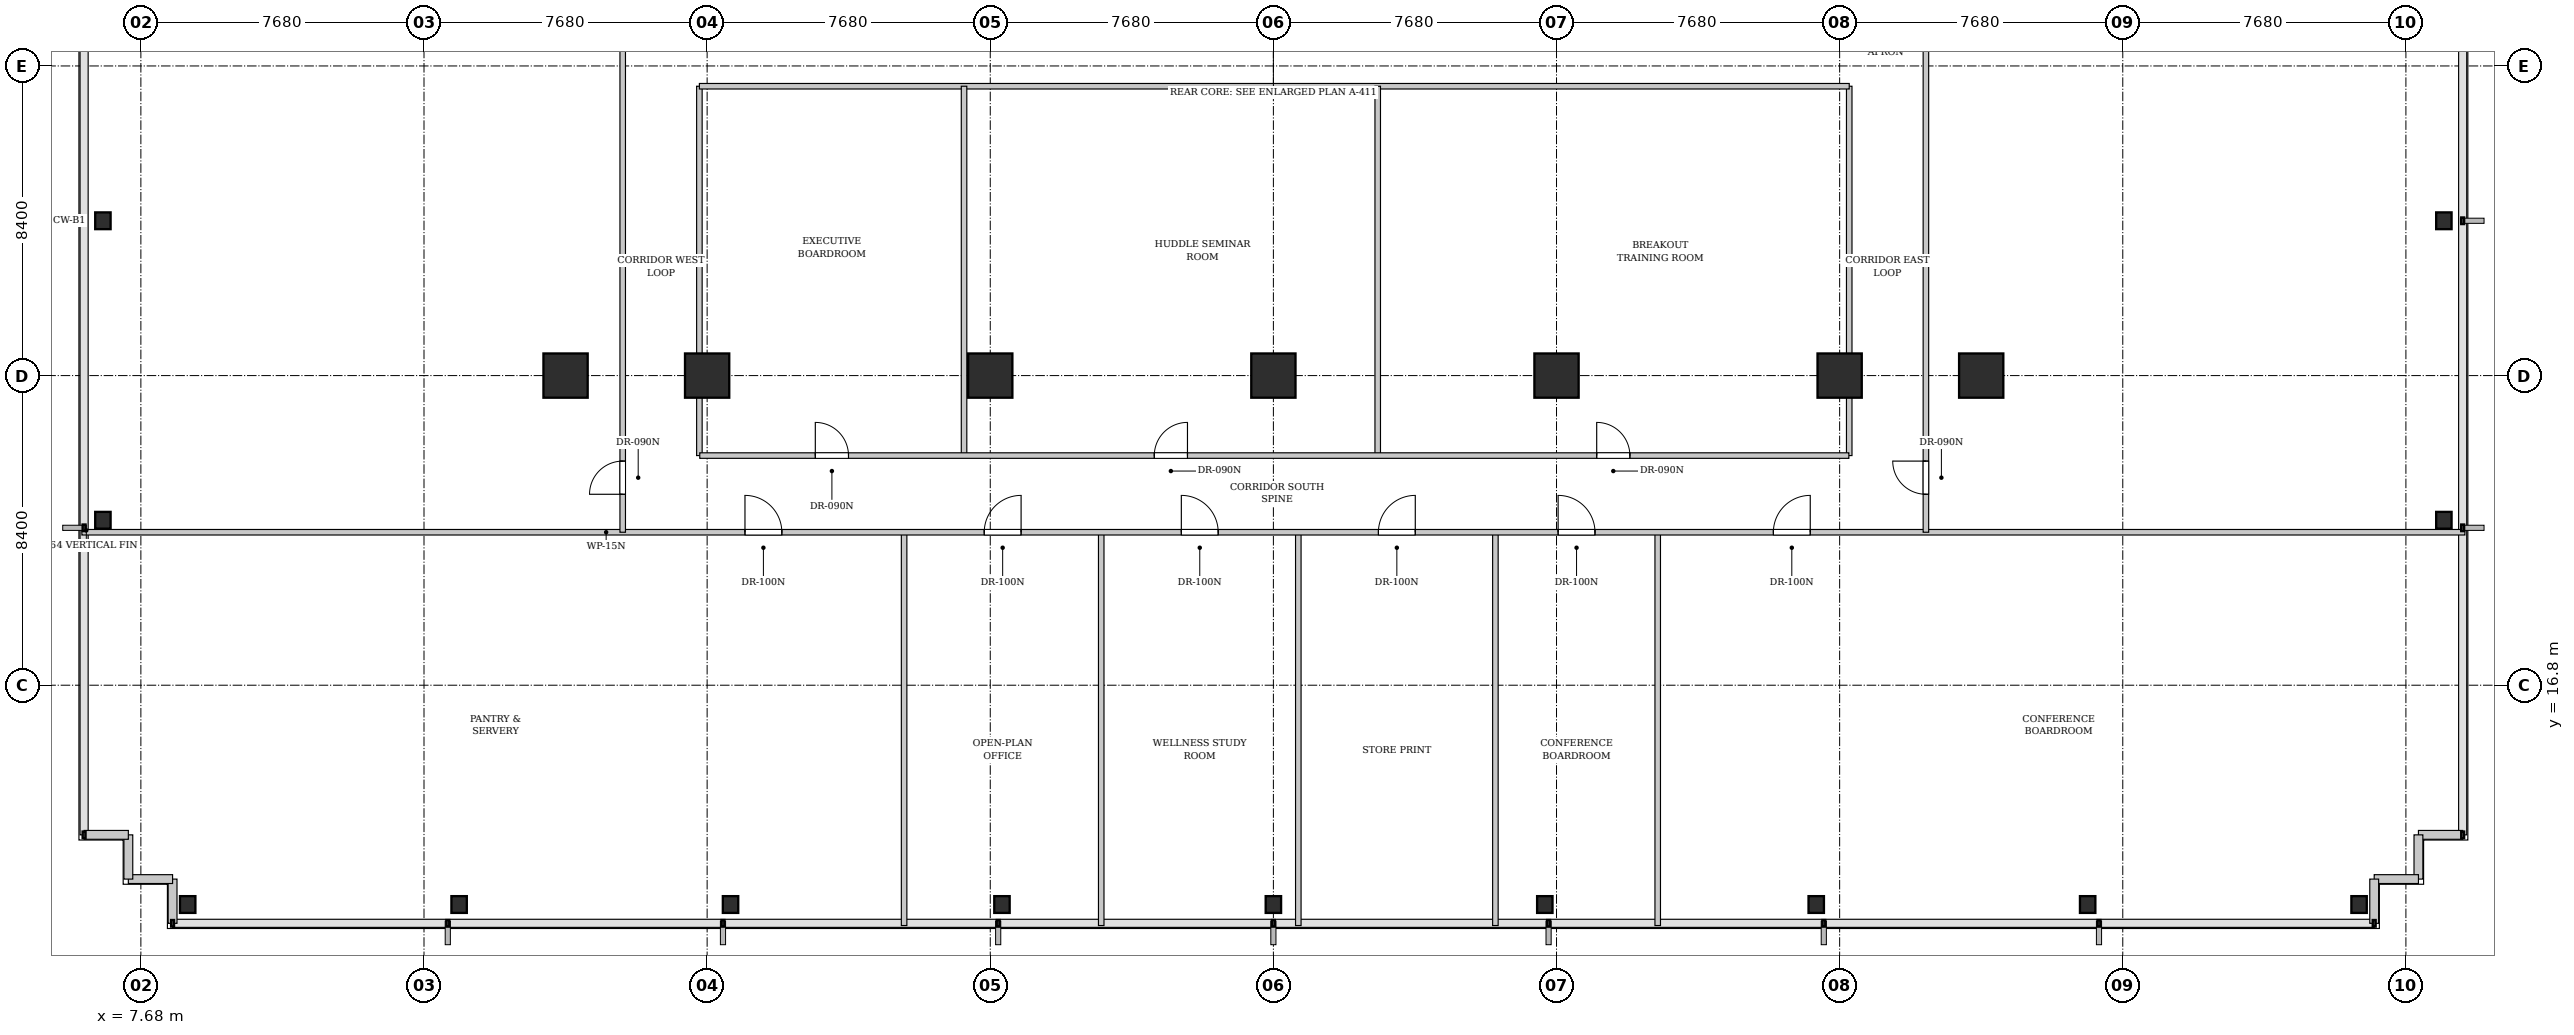
"""IFC4 building model, lengths in metres.
Left out: names, types, materials, properties, quantities, classifications, styles, units other than length and angle.
Written with IfcOpenShell. Run it as: python <this file> out.ifc"""

import sys

from ifc_helpers import new_model, si_unit, direction, frame, frame_2d, origin, origin_2d, place, context, subcontext, project, spatial, rectangle, i_section, extrude, element, fill, save


model = new_model("IFC4")
c1 = context("Model", 3, precision=1e-05, world=origin(), true_north=direction((0.0, 1.0)))
c2 = subcontext(c1, "Body", "Model", "MODEL_VIEW")
j1 = project(units=[si_unit("LENGTHUNIT", "METRE"), si_unit("PLANEANGLEUNIT", "RADIAN")], contexts=[c1])
p1 = place(None, origin())
s1 = spatial("IfcSite", under=j1, at=p1, CompositionType="ELEMENT")
p2 = place(p1, origin())
s2 = spatial("IfcBuilding", under=s1, at=p2, CompositionType="ELEMENT")
p3 = place(p2, frame((0.0, 0.0, 37.2)))
s3 = spatial("IfcBuildingStorey", under=s2, at=p3, CompositionType="ELEMENT", Elevation=37.2)
for number, where, z_axis, x_axis in (
    (1, (23.04, 25.2, 0.0), (0.0, 0.0, 1.0), (1.0, 0.0, 0.0)),
    (2, (30.72, 25.2, 0.0), (0.0, 0.0, 1.0), (1.0, 0.0, 0.0)),
    (3, (38.4, 25.2, 0.0), (0.0, 0.0, 1.0), (1.0, 0.0, 0.0)),
    (4, (46.08, 25.2, 0.0), (0.0, 0.0, 1.0), (1.0, 0.0, 0.0)),
    (5, (53.76, 25.2, 0.0), (0.0, 0.0, 1.0), (1.0, 0.0, 0.0)),
    (6, (19.2, 25.2, 0.0), (0.0, 0.0, 1.0), (1.0, 0.0, 0.0)),
    (7, (57.6, 25.2, 0.0), (0.0, 0.0, 1.0), (1.0, 0.0, 0.0)),
):
    element("IfcColumn", number, at=place(p3, frame(where, z_axis=z_axis, x_axis=x_axis)), inside=s3, PredefinedType="COLUMN", context=c2, shape_type="SweptSolid", body=[
        extrude(rectangle(XDim=1.2, YDim=1.2, at=origin_2d()), origin(), (0.0, 0.0, 1.0), 3.4),
    ])
for number, where, z_axis, x_axis in (
    (8, (8.95, 10.85, 0.0), (0.0, 0.0, 1.0), (1.0, 0.0, 0.0)),
    (9, (16.312, 10.85, 0.0), (0.0, 0.0, 1.0), (1.0, 0.0, 0.0)),
    (10, (23.675, 10.85, 0.0), (0.0, 0.0, 1.0), (1.0, 0.0, 0.0)),
    (11, (31.038, 10.85, 0.0), (0.0, 0.0, 1.0), (1.0, 0.0, 0.0)),
    (12, (38.4, 10.85, 0.0), (0.0, 0.0, 1.0), (1.0, 0.0, 0.0)),
    (13, (45.762, 10.85, 0.0), (0.0, 0.0, 1.0), (1.0, 0.0, 0.0)),
    (14, (53.125, 10.85, 0.0), (0.0, 0.0, 1.0), (1.0, 0.0, 0.0)),
    (15, (60.488, 10.85, 0.0), (0.0, 0.0, 1.0), (1.0, 0.0, 0.0)),
    (16, (67.85, 10.85, 0.0), (0.0, 0.0, 1.0), (1.0, 0.0, 0.0)),
    (17, (6.65, 21.275, 0.0), (0.0, 0.0, 1.0), (1.0, 0.0, 0.0)),
    (18, (70.15, 21.275, 0.0), (0.0, 0.0, 1.0), (1.0, 0.0, 0.0)),
    (19, (6.65, 29.4, 0.0), (0.0, 0.0, 1.0), (1.0, 0.0, 0.0)),
    (20, (70.15, 29.4, 0.0), (0.0, 0.0, 1.0), (1.0, 0.0, 0.0)),
):
    element("IfcColumn", number, at=place(p3, frame(where, z_axis=z_axis, x_axis=x_axis)), inside=s3, PredefinedType="COLUMN", context=c2, shape_type="SweptSolid", body=[
        extrude(i_section(OverallWidth=0.418, OverallDepth=0.455, WebThickness=0.042, FlangeThickness=0.068, FilletRadius=0.015, at=origin_2d()), origin(), (0.0, 0.0, 1.0), 3.4),
    ])
for number, where, z_axis, x_axis in (
    (21, (8.54, 10.34, 0.0), (0.0, 0.0, 1.0), (0.0, 1.0, 0.0)),
    (22, (8.54, 11.54, 0.0), (0.0, 0.0, 1.0), (-1.0, 0.0, 0.0)),
    (23, (7.34, 11.54, 0.0), (0.0, 0.0, 1.0), (0.0, 1.0, 0.0)),
):
    element("IfcWall", number, at=place(p3, frame(where, z_axis=z_axis, x_axis=x_axis)), inside=s3, PredefinedType="SOLIDWALL", context=c2, shape_type="SweptSolid", body=[
        extrude(rectangle(XDim=1.2, YDim=0.24, at=frame_2d((0.6, 0.0))), origin(), (0.0, 0.0, 1.0), 3.18),
    ])
p4 = place(p3, frame((7.34, 12.74, 0.0), z_axis=(0.0, 0.0, 1.0), x_axis=(-1.0, 0.0, 0.0)))
e24 = element("IfcWall", 24, at=p4, inside=s3, PredefinedType="SOLIDWALL", context=c2, shape_type="SweptSolid", body=[
    extrude(rectangle(XDim=1.2, YDim=0.24, at=frame_2d((0.6, 0.0))), origin(), (0.0, 0.0, 1.0), 3.18),
])
for number, where, z_axis, x_axis in (
    (25, (70.66, 12.74, 0.0), (0.0, 0.0, 1.0), (-1.0, 0.0, 0.0)),
    (26, (69.46, 12.74, 0.0), (0.0, 0.0, 1.0), (0.0, -1.0, 0.0)),
    (27, (69.46, 11.54, 0.0), (0.0, 0.0, 1.0), (-1.0, 0.0, 0.0)),
    (28, (68.26, 11.54, 0.0), (0.0, 0.0, 1.0), (0.0, -1.0, 0.0)),
):
    element("IfcWall", number, at=place(p3, frame(where, z_axis=z_axis, x_axis=x_axis)), inside=s3, PredefinedType="SOLIDWALL", context=c2, shape_type="SweptSolid", body=[
        extrude(rectangle(XDim=1.2, YDim=0.24, at=frame_2d((0.6, 0.0))), origin(), (0.0, 0.0, 1.0), 3.18),
    ])
for number, where, z_axis, x_axis in (
    (29, (28.383, 10.28, 0.0), (0.0, 0.0, 1.0), (0.0, 1.0, 0.0)),
    (30, (33.73, 10.28, 0.0), (0.0, 0.0, 1.0), (0.0, 1.0, 0.0)),
    (31, (39.076, 10.28, 0.0), (0.0, 0.0, 1.0), (0.0, 1.0, 0.0)),
    (32, (44.422, 10.28, 0.0), (0.0, 0.0, 1.0), (0.0, 1.0, 0.0)),
    (33, (48.825, 10.28, 0.0), (0.0, 0.0, 1.0), (0.0, 1.0, 0.0)),
):
    element("IfcWall", number, at=place(p3, frame(where, z_axis=z_axis, x_axis=x_axis)), inside=s3, PredefinedType="PARTITIONING", context=c2, shape_type="SweptSolid", body=[
        extrude(rectangle(XDim=10.69, YDim=0.15, at=frame_2d((5.345, 0.0))), origin(), (0.0, 0.0, 1.0), 3.18),
    ])
p5 = place(p3, frame((6.08, 20.95, 0.0), z_axis=(0.0, 0.0, 1.0), x_axis=(1.0, 0.0, 0.0)))
e34 = element("IfcWall", 34, at=p5, inside=s3, PredefinedType="PARTITIONING", context=c2, shape_type="SweptSolid", body=[
    extrude(rectangle(XDim=64.64, YDim=0.15, at=frame_2d((32.32, 0.0))), origin(), (0.0, 0.0, 1.0), 3.18),
])
p6 = place(p5, frame((17.987, 0.0, 0.0)))
e35 = element("IfcOpeningElement", 35, at=p6, cuts=e34, PredefinedType="OPENING", context=c2, shape_type="SweptSolid", body=[
    extrude(rectangle(XDim=1.0, YDim=2.15, at=frame_2d((0.5, 1.075))), frame((0.0, 0.085, 0.0), z_axis=(0.0, -1.0, 0.0), x_axis=(1.0, 0.0, 0.0)), (0.0, 0.0, 1.0), 0.17),
])
p7 = place(p5, frame((24.477, 0.0, 0.0)))
e36 = element("IfcOpeningElement", 36, at=p7, cuts=e34, PredefinedType="OPENING", context=c2, shape_type="SweptSolid", body=[
    extrude(rectangle(XDim=1.0, YDim=2.15, at=frame_2d((0.5, 1.075))), frame((0.0, 0.085, 0.0), z_axis=(0.0, -1.0, 0.0), x_axis=(1.0, 0.0, 0.0)), (0.0, 0.0, 1.0), 0.17),
])
p8 = place(p5, frame((29.823, 0.0, 0.0)))
e37 = element("IfcOpeningElement", 37, at=p8, cuts=e34, PredefinedType="OPENING", context=c2, shape_type="SweptSolid", body=[
    extrude(rectangle(XDim=1.0, YDim=2.15, at=frame_2d((0.5, 1.075))), frame((0.0, 0.085, 0.0), z_axis=(0.0, -1.0, 0.0), x_axis=(1.0, 0.0, 0.0)), (0.0, 0.0, 1.0), 0.17),
])
p9 = place(p5, frame((35.169, 0.0, 0.0)))
e38 = element("IfcOpeningElement", 38, at=p9, cuts=e34, PredefinedType="OPENING", context=c2, shape_type="SweptSolid", body=[
    extrude(rectangle(XDim=1.0, YDim=2.15, at=frame_2d((0.5, 1.075))), frame((0.0, 0.085, 0.0), z_axis=(0.0, -1.0, 0.0), x_axis=(1.0, 0.0, 0.0)), (0.0, 0.0, 1.0), 0.17),
])
p10 = place(p5, frame((40.043, 0.0, 0.0)))
e39 = element("IfcOpeningElement", 39, at=p10, cuts=e34, PredefinedType="OPENING", context=c2, shape_type="SweptSolid", body=[
    extrude(rectangle(XDim=1.0, YDim=2.15, at=frame_2d((0.5, 1.075))), frame((0.0, 0.085, 0.0), z_axis=(0.0, -1.0, 0.0), x_axis=(1.0, 0.0, 0.0)), (0.0, 0.0, 1.0), 0.17),
])
p11 = place(p5, frame((45.883, 0.0, 0.0)))
e40 = element("IfcOpeningElement", 40, at=p11, cuts=e34, PredefinedType="OPENING", context=c2, shape_type="SweptSolid", body=[
    extrude(rectangle(XDim=1.0, YDim=2.15, at=frame_2d((0.5, 1.075))), frame((0.0, 0.085, 0.0), z_axis=(0.0, -1.0, 0.0), x_axis=(1.0, 0.0, 0.0)), (0.0, 0.0, 1.0), 0.17),
])
p12 = place(p3, frame((20.75, 20.95, 0.0), z_axis=(0.0, 0.0, 1.0), x_axis=(0.0, 1.0, 0.0)))
e41 = element("IfcWall", 41, at=p12, inside=s3, PredefinedType="PARTITIONING", context=c2, shape_type="SweptSolid", body=[
    extrude(rectangle(XDim=27.57, YDim=0.15, at=frame_2d((13.785, 0.0))), origin(), (0.0, 0.0, 1.0), 3.18),
])
p13 = place(p12, frame((1.03, 0.0, 0.0)))
e42 = element("IfcOpeningElement", 42, at=p13, cuts=e41, PredefinedType="OPENING", context=c2, shape_type="SweptSolid", body=[
    extrude(rectangle(XDim=0.9, YDim=2.15, at=frame_2d((0.45, 1.075))), frame((0.0, 0.085, 0.0), z_axis=(0.0, -1.0, 0.0), x_axis=(1.0, 0.0, 0.0)), (0.0, 0.0, 1.0), 0.17),
])
p14 = place(p3, frame((56.1, 20.95, 0.0), z_axis=(0.0, 0.0, 1.0), x_axis=(0.0, 1.0, 0.0)))
e43 = element("IfcWall", 43, at=p14, inside=s3, PredefinedType="PARTITIONING", context=c2, shape_type="SweptSolid", body=[
    extrude(rectangle(XDim=27.57, YDim=0.15, at=frame_2d((13.785, 0.0))), origin(), (0.0, 0.0, 1.0), 3.18),
])
p15 = place(p14, frame((1.03, 0.0, 0.0)))
e44 = element("IfcOpeningElement", 44, at=p15, cuts=e43, PredefinedType="OPENING", context=c2, shape_type="SweptSolid", body=[
    extrude(rectangle(XDim=0.9, YDim=2.15, at=frame_2d((0.45, 1.075))), frame((0.0, 0.085, 0.0), z_axis=(0.0, -1.0, 0.0), x_axis=(1.0, 0.0, 0.0)), (0.0, 0.0, 1.0), 0.17),
])
p16 = place(p3, frame((22.83, 23.03, 0.0), z_axis=(0.0, 0.0, 1.0), x_axis=(0.0, 1.0, 0.0)))
e45 = element("IfcWall", 45, at=p16, inside=s3, PredefinedType="PARTITIONING", context=c2, shape_type="SweptSolid", body=[
    extrude(rectangle(XDim=10.02, YDim=0.15, at=frame_2d((5.01, 0.0))), origin(), (0.0, 0.0, 1.0), 2.475),
])
p17 = place(p3, frame((54.02, 23.03, 0.0), z_axis=(0.0, 0.0, 1.0), x_axis=(0.0, 1.0, 0.0)))
e46 = element("IfcWall", 46, at=p17, inside=s3, PredefinedType="PARTITIONING", context=c2, shape_type="SweptSolid", body=[
    extrude(rectangle(XDim=10.02, YDim=0.15, at=frame_2d((5.01, 0.0))), origin(), (0.0, 0.0, 1.0), 3.18),
])
p18 = place(p3, frame((22.83, 33.05, 0.0), z_axis=(0.0, 0.0, 1.0), x_axis=(1.0, 0.0, 0.0)))
e47 = element("IfcWall", 47, at=p18, inside=s3, PredefinedType="PARTITIONING", context=c2, shape_type="SweptSolid", body=[
    extrude(rectangle(XDim=31.19, YDim=0.15, at=frame_2d((15.595, 0.0))), origin(), (0.0, 0.0, 1.0), 3.18),
])
for number, where, z_axis, x_axis in (
    (48, (30.009, 23.03, 0.0), (0.0, 0.0, 1.0), (0.0, 1.0, 0.0)),
    (49, (41.23, 23.03, 0.0), (0.0, 0.0, 1.0), (0.0, 1.0, 0.0)),
):
    element("IfcWall", number, at=place(p3, frame(where, z_axis=z_axis, x_axis=x_axis)), inside=s3, PredefinedType="PARTITIONING", context=c2, shape_type="SweptSolid", body=[
        extrude(rectangle(XDim=10.02, YDim=0.15, at=frame_2d((5.01, 0.0))), origin(), (0.0, 0.0, 1.0), 3.18),
    ])
p19 = place(p3, frame((22.84, 23.03, 0.0), z_axis=(0.0, 0.0, 1.0), x_axis=(1.0, 0.0, 0.0)))
e50 = element("IfcWall", 50, at=p19, inside=s3, PredefinedType="PARTITIONING", context=c2, shape_type="SweptSolid", body=[
    extrude(rectangle(XDim=31.17, YDim=0.15, at=frame_2d((15.585, 0.0))), origin(), (0.0, 0.0, 1.0), 3.18),
])
p20 = place(p19, frame((3.135, 0.0, 0.0)))
e51 = element("IfcOpeningElement", 51, at=p20, cuts=e50, PredefinedType="OPENING", context=c2, shape_type="SweptSolid", body=[
    extrude(rectangle(XDim=0.9, YDim=2.15, at=frame_2d((0.45, 1.075))), frame((0.0, 0.085, 0.0), z_axis=(0.0, -1.0, 0.0), x_axis=(1.0, 0.0, 0.0)), (0.0, 0.0, 1.0), 0.17),
])
p21 = place(p19, frame((12.33, 0.0, 0.0)))
e52 = element("IfcOpeningElement", 52, at=p21, cuts=e50, PredefinedType="OPENING", context=c2, shape_type="SweptSolid", body=[
    extrude(rectangle(XDim=0.9, YDim=2.15, at=frame_2d((0.45, 1.075))), frame((0.0, 0.085, 0.0), z_axis=(0.0, -1.0, 0.0), x_axis=(1.0, 0.0, 0.0)), (0.0, 0.0, 1.0), 0.17),
])
p22 = place(p19, frame((24.33, 0.0, 0.0)))
e53 = element("IfcOpeningElement", 53, at=p22, cuts=e50, PredefinedType="OPENING", context=c2, shape_type="SweptSolid", body=[
    extrude(rectangle(XDim=0.9, YDim=2.15, at=frame_2d((0.45, 1.075))), frame((0.0, 0.085, 0.0), z_axis=(0.0, -1.0, 0.0), x_axis=(1.0, 0.0, 0.0)), (0.0, 0.0, 1.0), 0.17),
])
p23 = place(p6, origin())
e54 = element("IfcDoor", 54, at=p23, inside=s3, OperationType="SINGLE_SWING_LEFT", PredefinedType="DOOR", context=c2, shape_type="SweptSolid", body=[
    extrude(rectangle(XDim=1.0, YDim=2.15, at=frame_2d((0.5, 1.075))), frame((0.0, 0.025, 0.0), z_axis=(0.0, -1.0, 0.0), x_axis=(1.0, 0.0, 0.0)), (0.0, 0.0, 1.0), 0.05),
])
fill(e35, e54)
p24 = place(p7, origin())
e55 = element("IfcDoor", 55, at=p24, inside=s3, OperationType="SINGLE_SWING_RIGHT", PredefinedType="DOOR", context=c2, shape_type="SweptSolid", body=[
    extrude(rectangle(XDim=1.0, YDim=2.15, at=frame_2d((0.5, 1.075))), frame((0.0, 0.025, 0.0), z_axis=(0.0, -1.0, 0.0), x_axis=(1.0, 0.0, 0.0)), (0.0, 0.0, 1.0), 0.05),
])
fill(e36, e55)
p25 = place(p8, origin())
e56 = element("IfcDoor", 56, at=p25, inside=s3, OperationType="SINGLE_SWING_LEFT", PredefinedType="DOOR", context=c2, shape_type="SweptSolid", body=[
    extrude(rectangle(XDim=1.0, YDim=2.15, at=frame_2d((0.5, 1.075))), frame((0.0, 0.025, 0.0), z_axis=(0.0, -1.0, 0.0), x_axis=(1.0, 0.0, 0.0)), (0.0, 0.0, 1.0), 0.05),
])
fill(e37, e56)
p26 = place(p9, origin())
e57 = element("IfcDoor", 57, at=p26, inside=s3, OperationType="SINGLE_SWING_RIGHT", PredefinedType="DOOR", context=c2, shape_type="SweptSolid", body=[
    extrude(rectangle(XDim=1.0, YDim=2.15, at=frame_2d((0.5, 1.075))), frame((0.0, 0.025, 0.0), z_axis=(0.0, -1.0, 0.0), x_axis=(1.0, 0.0, 0.0)), (0.0, 0.0, 1.0), 0.05),
])
fill(e38, e57)
p27 = place(p10, origin())
e58 = element("IfcDoor", 58, at=p27, inside=s3, OperationType="SINGLE_SWING_LEFT", PredefinedType="DOOR", context=c2, shape_type="SweptSolid", body=[
    extrude(rectangle(XDim=1.0, YDim=2.15, at=frame_2d((0.5, 1.075))), frame((0.0, 0.025, 0.0), z_axis=(0.0, -1.0, 0.0), x_axis=(1.0, 0.0, 0.0)), (0.0, 0.0, 1.0), 0.05),
])
fill(e39, e58)
p28 = place(p11, origin())
e59 = element("IfcDoor", 59, at=p28, inside=s3, OperationType="SINGLE_SWING_RIGHT", PredefinedType="DOOR", context=c2, shape_type="SweptSolid", body=[
    extrude(rectangle(XDim=1.0, YDim=2.15, at=frame_2d((0.5, 1.075))), frame((0.0, 0.025, 0.0), z_axis=(0.0, -1.0, 0.0), x_axis=(1.0, 0.0, 0.0)), (0.0, 0.0, 1.0), 0.05),
])
fill(e40, e59)
p29 = place(p13, origin())
e60 = element("IfcDoor", 60, at=p29, inside=s3, OperationType="SINGLE_SWING_LEFT", PredefinedType="DOOR", context=c2, shape_type="SweptSolid", body=[
    extrude(rectangle(XDim=0.9, YDim=2.15, at=frame_2d((0.45, 1.075))), frame((0.0, 0.025, 0.0), z_axis=(0.0, -1.0, 0.0), x_axis=(1.0, 0.0, 0.0)), (0.0, 0.0, 1.0), 0.05),
])
fill(e42, e60)
p30 = place(p15, origin())
e61 = element("IfcDoor", 61, at=p30, inside=s3, OperationType="SINGLE_SWING_RIGHT", PredefinedType="DOOR", context=c2, shape_type="SweptSolid", body=[
    extrude(rectangle(XDim=0.9, YDim=2.15, at=frame_2d((0.45, 1.075))), frame((0.0, 0.025, 0.0), z_axis=(0.0, -1.0, 0.0), x_axis=(1.0, 0.0, 0.0)), (0.0, 0.0, 1.0), 0.05),
])
fill(e44, e61)
p31 = place(p20, origin())
e62 = element("IfcDoor", 62, at=p31, inside=s3, OperationType="SINGLE_SWING_LEFT", PredefinedType="DOOR", context=c2, shape_type="SweptSolid", body=[
    extrude(rectangle(XDim=0.9, YDim=2.15, at=frame_2d((0.45, 1.075))), frame((0.0, 0.025, 0.0), z_axis=(0.0, -1.0, 0.0), x_axis=(1.0, 0.0, 0.0)), (0.0, 0.0, 1.0), 0.05),
])
fill(e51, e62)
p32 = place(p21, origin())
e63 = element("IfcDoor", 63, at=p32, inside=s3, OperationType="SINGLE_SWING_RIGHT", PredefinedType="DOOR", context=c2, shape_type="SweptSolid", body=[
    extrude(rectangle(XDim=0.9, YDim=2.15, at=frame_2d((0.45, 1.075))), frame((0.0, 0.025, 0.0), z_axis=(0.0, -1.0, 0.0), x_axis=(1.0, 0.0, 0.0)), (0.0, 0.0, 1.0), 0.05),
])
fill(e52, e63)
p33 = place(p22, origin())
e64 = element("IfcDoor", 64, at=p33, inside=s3, OperationType="SINGLE_SWING_LEFT", PredefinedType="DOOR", context=c2, shape_type="SweptSolid", body=[
    extrude(rectangle(XDim=0.9, YDim=2.15, at=frame_2d((0.45, 1.075))), frame((0.0, 0.025, 0.0), z_axis=(0.0, -1.0, 0.0), x_axis=(1.0, 0.0, 0.0)), (0.0, 0.0, 1.0), 0.05),
])
fill(e53, e64)
save(model, sys.argv[1])
